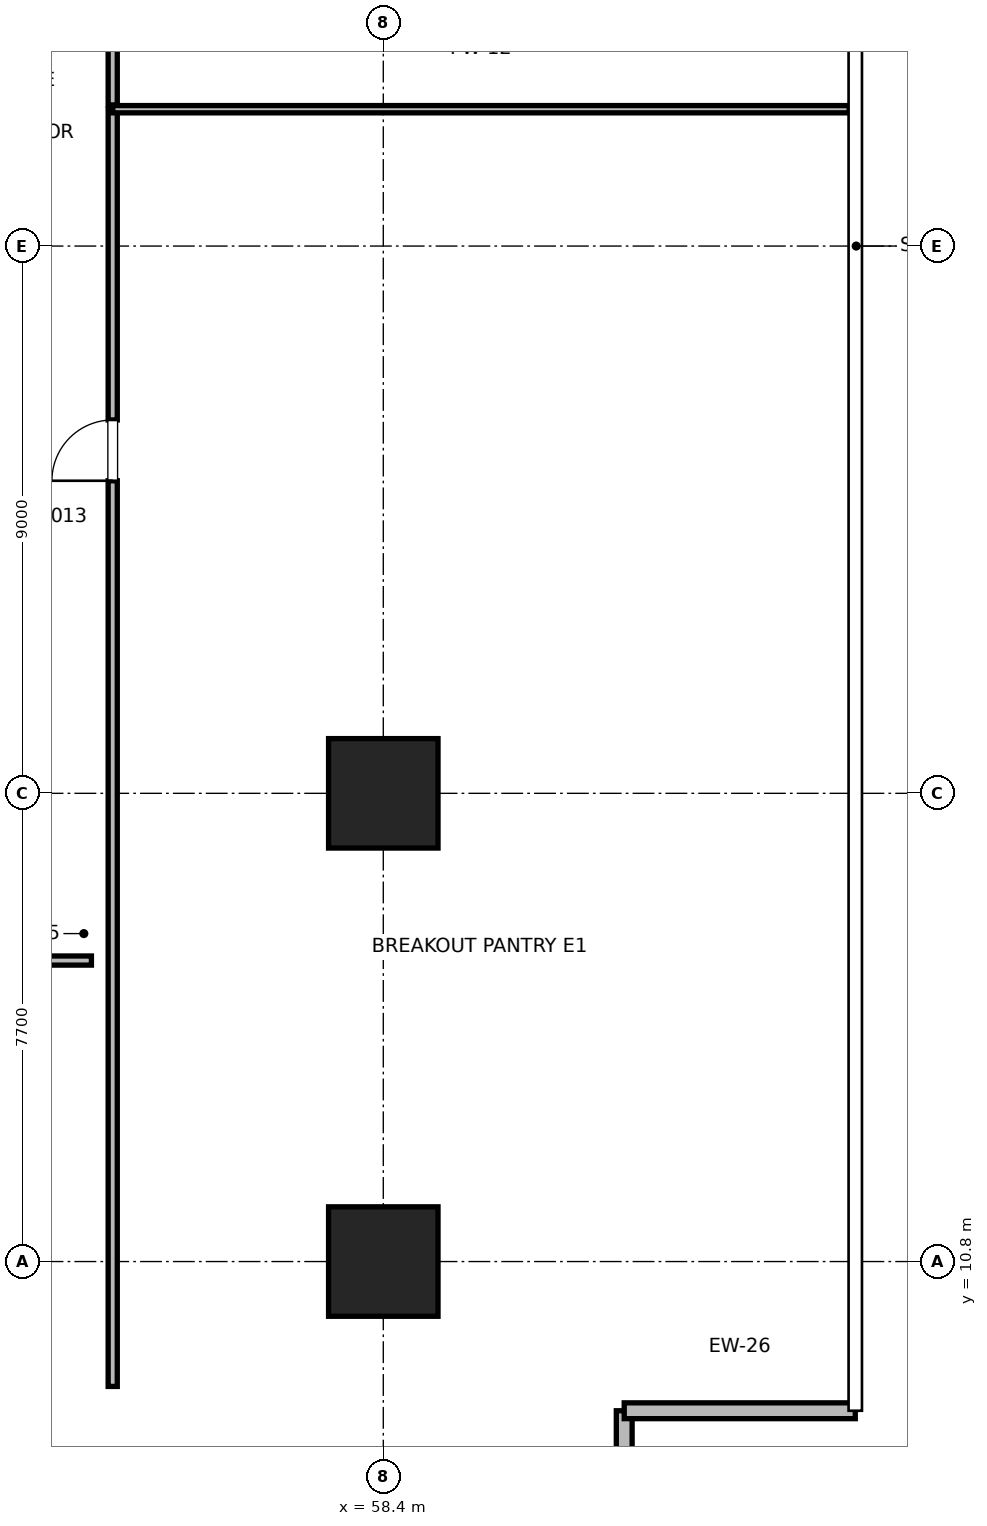
"""IFC4 building model, lengths in metres.
Left out: names, types, materials, properties, quantities, classifications, styles, units other than length and angle.
Written with IfcOpenShell. Run it as: python <this file> out.ifc"""

import sys

from ifc_helpers import new_model, si_unit, direction, frame, frame_2d, origin, origin_2d, place, context, subcontext, project, spatial, rectangle, extrude, element, fill, save


model = new_model("IFC4")
c1 = context("Model", 3, precision=1e-05, world=origin(), true_north=direction((0.0, 1.0)))
c2 = subcontext(c1, "Body", "Model", "MODEL_VIEW")
j1 = project(units=[si_unit("LENGTHUNIT", "METRE"), si_unit("PLANEANGLEUNIT", "RADIAN")], contexts=[c1])
p1 = place(None, origin())
s1 = spatial("IfcSite", under=j1, at=p1, CompositionType="ELEMENT")
p2 = place(p1, origin())
s2 = spatial("IfcBuilding", under=s1, at=p2, CompositionType="ELEMENT")
p3 = place(p2, frame((0.0, 0.0, 75.6)))
s3 = spatial("IfcBuildingStorey", under=s2, at=p3, CompositionType="ELEMENT", Elevation=75.6)
for number, where, z_axis, x_axis in (
    (1, (58.4, 18.5, 0.0), (0.0, 0.0, 1.0), (1.0, 0.0, 0.0)),
    (2, (58.4, 10.8, 0.0), (0.0, 0.0, 1.0), (1.0, 0.0, 0.0)),
):
    element("IfcColumn", number, at=place(p3, frame(where, z_axis=z_axis, x_axis=x_axis)), inside=s3, PredefinedType="COLUMN", context=c2, shape_type="SweptSolid", body=[
        extrude(rectangle(XDim=1.8, YDim=1.8, at=origin_2d()), origin(), (0.0, 0.0, 1.0), 4.0),
    ])
p4 = place(p3, frame((62.362, 4.946, 0.0), z_axis=(0.0, 0.0, 1.0), x_axis=(0.0, 1.0, 0.0)))
e3 = element("IfcWall", 3, at=p4, inside=s3, PredefinedType="PARAPET", context=c2, shape_type="SweptSolid", body=[
    extrude(rectangle(XDim=3.4, YDim=0.26, at=frame_2d((1.7, 0.0))), origin(), (0.0, 0.0, 1.0), 3.76),
])
p5 = place(p4, frame((1.0, 0.0, 0.85)))
e4 = element("IfcOpeningElement", 4, at=p5, cuts=e3, PredefinedType="OPENING", context=c2, shape_type="SweptSolid", body=[
    extrude(rectangle(XDim=1.4, YDim=2.0, at=frame_2d((0.7, 1.0))), frame((0.0, 0.13, 0.0), z_axis=(0.0, -1.0, 0.0), x_axis=(1.0, 0.0, 0.0)), (0.0, 0.0, 1.0), 0.26),
])
p6 = place(p3, frame((62.362, 8.346, 0.0), z_axis=(0.0, 0.0, 1.0), x_axis=(1.0, 0.0, 0.0)))
e5 = element("IfcWall", 5, at=p6, inside=s3, PredefinedType="PARAPET", context=c2, shape_type="SweptSolid", body=[
    extrude(rectangle(XDim=3.8, YDim=0.26, at=frame_2d((1.9, 0.0))), origin(), (0.0, 0.0, 1.0), 3.76),
])
p7 = place(p3, frame((47.958, 15.75, 0.0), z_axis=(0.0, 0.0, 1.0), x_axis=(1.0, 0.0, 0.0)))
e6 = element("IfcWall", 6, at=p7, inside=s3, PredefinedType="PARTITIONING", context=c2, shape_type="SweptSolid", body=[
    extrude(rectangle(XDim=5.642, YDim=0.15, at=frame_2d((2.821, 0.0))), origin(), (0.0, 0.0, 1.0), 2.85),
])
p8 = place(p7, frame((2.271, 0.0, 0.0)))
e7 = element("IfcOpeningElement", 7, at=p8, cuts=e6, PredefinedType="OPENING", context=c2, shape_type="SweptSolid", body=[
    extrude(rectangle(XDim=1.0, YDim=2.15, at=frame_2d((0.5, 1.075))), frame((0.0, 0.075, 0.0), z_axis=(0.0, -1.0, 0.0), x_axis=(1.0, 0.0, 0.0)), (0.0, 0.0, 1.0), 0.15),
])
p9 = place(p3, frame((53.95, 8.746, 0.0), z_axis=(0.0, 0.0, 1.0), x_axis=(0.0, 1.0, 0.0)))
e8 = element("IfcWall", 8, at=p9, inside=s3, PredefinedType="PARTITIONING", context=c2, shape_type="SweptSolid", body=[
    extrude(rectangle(XDim=21.004, YDim=0.15, at=frame_2d((10.502, 0.0))), origin(), (0.0, 0.0, 1.0), 2.85),
])
p10 = place(p9, frame((14.894, 0.0, 0.0)))
e9 = element("IfcOpeningElement", 9, at=p10, cuts=e8, PredefinedType="OPENING", context=c2, shape_type="SweptSolid", body=[
    extrude(rectangle(XDim=1.0, YDim=2.15, at=frame_2d((0.5, 1.075))), frame((0.0, 0.075, 0.0), z_axis=(0.0, -1.0, 0.0), x_axis=(1.0, 0.0, 0.0)), (0.0, 0.0, 1.0), 0.15),
])
p11 = place(p3, frame((53.95, 29.75, 0.0), z_axis=(0.0, 0.0, 1.0), x_axis=(1.0, 0.0, 0.0)))
e10 = element("IfcWall", 10, at=p11, inside=s3, PredefinedType="PARTITIONING", context=c2, shape_type="SweptSolid", body=[
    extrude(rectangle(XDim=12.113, YDim=0.12, at=frame_2d((6.056, 0.0))), origin(), (0.0, 0.0, 1.0), 2.85),
])
p12 = place(p3, frame((53.95, 29.82, 0.0), z_axis=(0.0, 0.0, 1.0), x_axis=(0.0, 1.0, 0.0)))
e11 = element("IfcWall", 11, at=p12, inside=s3, PredefinedType="PARTITIONING", context=c2, shape_type="SweptSolid", body=[
    extrude(rectangle(XDim=16.433, YDim=0.15, at=frame_2d((8.217, 0.0))), origin(), (0.0, 0.0, 1.0), 2.85),
])
p13 = place(p12, frame((2.79, 0.0, 0.0)))
e12 = element("IfcOpeningElement", 12, at=p13, cuts=e11, PredefinedType="OPENING", context=c2, shape_type="SweptSolid", body=[
    extrude(rectangle(XDim=1.0, YDim=2.15, at=frame_2d((0.5, 1.075))), frame((0.0, 0.075, 0.0), z_axis=(0.0, -1.0, 0.0), x_axis=(1.0, 0.0, 0.0)), (0.0, 0.0, 1.0), 0.15),
])
p14 = place(p10, origin())
e13 = element("IfcDoor", 13, at=p14, inside=s3, OperationType="SINGLE_SWING_LEFT", PredefinedType="DOOR", context=c2, shape_type="SweptSolid", body=[
    extrude(rectangle(XDim=1.0, YDim=2.15, at=frame_2d((0.5, 1.075))), frame((0.0, 0.025, 0.0), z_axis=(0.0, -1.0, 0.0), x_axis=(1.0, 0.0, 0.0)), (0.0, 0.0, 1.0), 0.05),
])
fill(e9, e13)
save(model, sys.argv[1])
